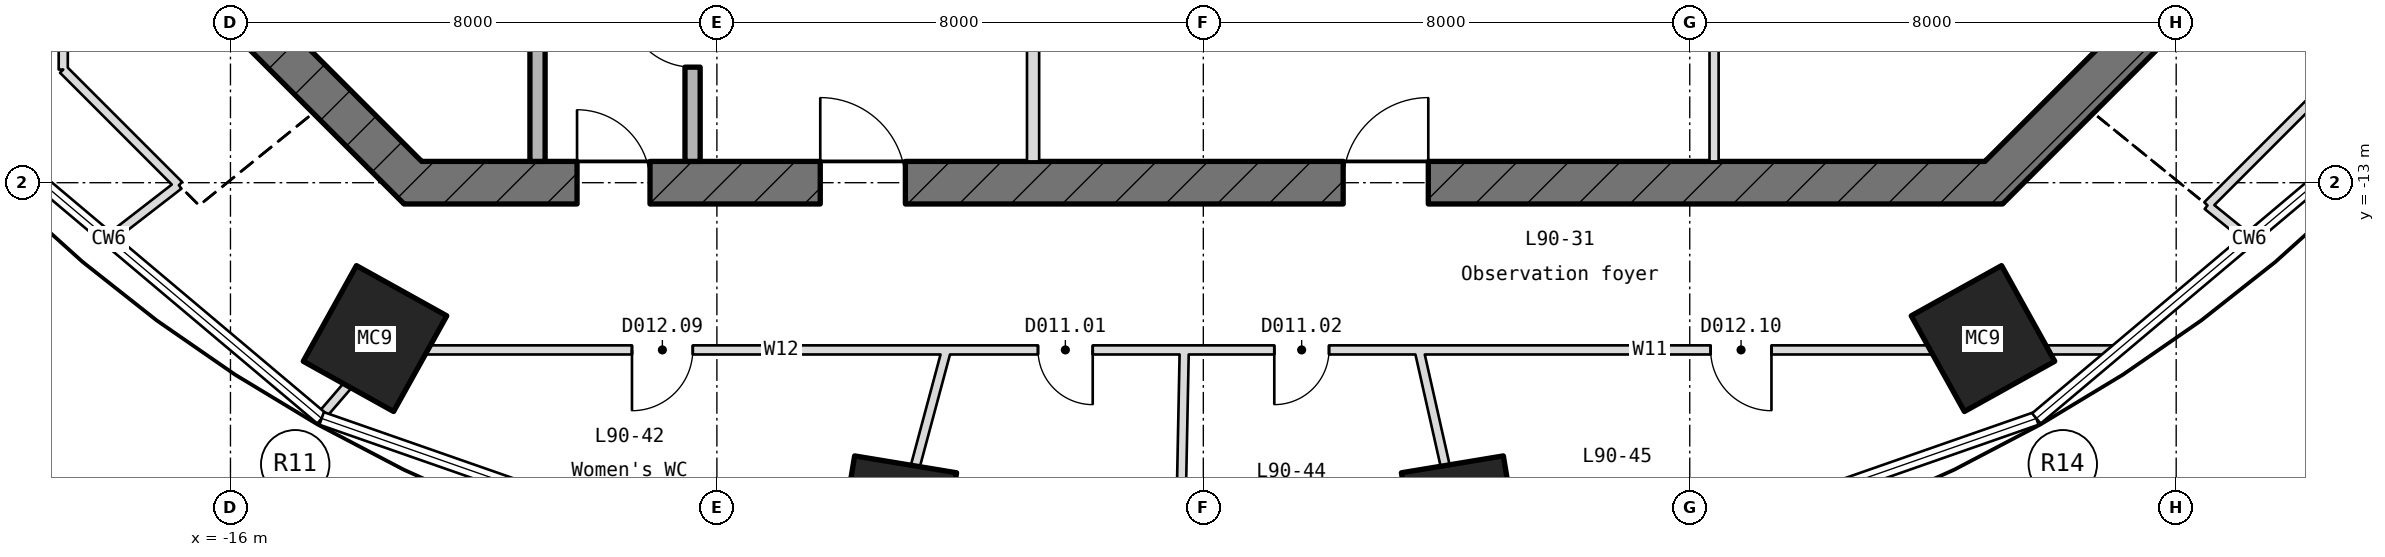
"""IFC4 building model, lengths in metres.
Left out: names, types, materials, properties, quantities, classifications, styles, units other than length and angle.
Written with IfcOpenShell. Run it as: python <this file> out.ifc"""

import sys

from ifc_helpers import new_model, si_unit, direction, frame, frame_2d, origin, origin_2d, place, context, subcontext, project, spatial, rectangle, hollow_rectangle, extrude, element, fill, save


model = new_model("IFC4")
c1 = context("Model", 3, precision=1e-05, world=origin(), true_north=direction((0.0, 1.0)))
c2 = subcontext(c1, "Body", "Model", "MODEL_VIEW")
j1 = project(units=[si_unit("LENGTHUNIT", "METRE"), si_unit("PLANEANGLEUNIT", "RADIAN")], contexts=[c1])
p1 = place(None, origin())
s1 = spatial("IfcSite", under=j1, at=p1, CompositionType="ELEMENT")
p2 = place(p1, origin())
s2 = spatial("IfcBuilding", under=s1, at=p2, CompositionType="ELEMENT")
p3 = place(p2, frame((0.0, 0.0, 396.55)))
s3 = spatial("IfcBuildingStorey", under=s2, at=p3, CompositionType="ELEMENT", Elevation=396.55)
for number, where, z_axis, x_axis in (
    (1, (-13.623, -15.563, -0.25), (0.0, 0.0, 1.0), (-0.874, 0.486, 0.0)),
    (2, (-5.043, -18.52, -0.25), (0.0, 0.0, 1.0), (-0.987, 0.163, 0.0)),
    (3, (4.243, -18.52, -0.25), (0.0, 0.0, 1.0), (-0.987, -0.163, 0.0)),
    (4, (12.823, -15.563, -0.25), (0.0, 0.0, 1.0), (-0.874, -0.486, 0.0)),
):
    element("IfcColumn", number, at=place(p3, frame(where, z_axis=z_axis, x_axis=x_axis)), inside=s3, PredefinedType="COLUMN", context=c2, shape_type="SweptSolid", body=[
        extrude(hollow_rectangle(XDim=1.7, YDim=1.8, WallThickness=0.05, at=origin_2d()), origin(), (0.0, 0.0, 1.0), 5.4),
    ])
for number, where, z_axis, x_axis in (
    (5, (12.897, -13.103, -0.25), (0.0, 0.0, 1.0), (0.707, 0.707, 0.0)),
    (6, (-16.103, -9.897, -0.25), (0.0, 0.0, 1.0), (0.707, -0.707, 0.0)),
):
    element("IfcWall", number, at=place(p3, frame(where, z_axis=z_axis, x_axis=x_axis)), inside=s3, PredefinedType="SHEAR", context=c2, shape_type="SweptSolid", body=[
        extrude(rectangle(XDim=4.533, YDim=0.7, at=frame_2d((2.266, 0.0))), origin(), (0.0, 0.0, 1.0), 5.4),
    ])
p4 = place(p3, frame((-13.145, -13.0, -0.25), z_axis=(0.0, 0.0, 1.0), x_axis=(1.0, 0.0, 0.0)))
e7 = element("IfcWall", 7, at=p4, inside=s3, PredefinedType="SHEAR", context=c2, shape_type="SweptSolid", body=[
    extrude(rectangle(XDim=26.29, YDim=0.7, at=frame_2d((13.145, 0.0))), origin(), (0.0, 0.0, 1.0), 5.4),
])
p5 = place(p4, frame((2.845, 0.0, 0.25)))
e8 = element("IfcOpeningElement", 8, at=p5, cuts=e7, PredefinedType="OPENING", context=c2, shape_type="SweptSolid", body=[
    extrude(rectangle(XDim=1.2, YDim=2.1, at=frame_2d((0.6, 1.05))), frame((0.0, 0.36, 0.0), z_axis=(0.0, -1.0, 0.0), x_axis=(1.0, 0.0, 0.0)), (0.0, 0.0, 1.0), 0.72),
])
p6 = place(p4, frame((6.845, 0.0, 0.25)))
e9 = element("IfcOpeningElement", 9, at=p6, cuts=e7, PredefinedType="OPENING", context=c2, shape_type="SweptSolid", body=[
    extrude(rectangle(XDim=1.4, YDim=2.1, at=frame_2d((0.7, 1.05))), frame((0.0, 0.36, 0.0), z_axis=(0.0, -1.0, 0.0), x_axis=(1.0, 0.0, 0.0)), (0.0, 0.0, 1.0), 0.72),
])
p7 = place(p4, frame((15.445, 0.0, 0.25)))
e10 = element("IfcOpeningElement", 10, at=p7, cuts=e7, PredefinedType="OPENING", context=c2, shape_type="SweptSolid", body=[
    extrude(rectangle(XDim=1.4, YDim=2.1, at=frame_2d((0.7, 1.05))), frame((0.0, 0.36, 0.0), z_axis=(0.0, -1.0, 0.0), x_axis=(1.0, 0.0, 0.0)), (0.0, 0.0, 1.0), 0.72),
])
p8 = place(p3, frame((-10.95, -12.65, 0.0), z_axis=(0.0, 0.0, 1.0), x_axis=(0.0, 1.0, 0.0)))
e11 = element("IfcWall", 11, at=p8, inside=s3, PredefinedType="STANDARD", context=c2, shape_type="SweptSolid", body=[
    extrude(rectangle(XDim=3.775, YDim=0.25, at=frame_2d((1.887, 0.0))), origin(), (0.0, 0.0, 1.0), 5.15),
])
p9 = place(p3, frame((-8.4, -12.65, 0.0), z_axis=(0.0, 0.0, 1.0), x_axis=(0.0, 1.0, 0.0)))
e12 = element("IfcWall", 12, at=p9, inside=s3, PredefinedType="STANDARD", context=c2, shape_type="SweptSolid", body=[
    extrude(rectangle(XDim=3.9, YDim=0.25, at=frame_2d((1.95, 0.0))), origin(), (0.0, 0.0, 1.0), 5.15),
])
p10 = place(p9, frame((1.55, 0.0, 0.0)))
e13 = element("IfcOpeningElement", 13, at=p10, cuts=e12, PredefinedType="OPENING", context=c2, shape_type="SweptSolid", body=[
    extrude(rectangle(XDim=1.1, YDim=2.1, at=frame_2d((0.55, 1.05))), frame((0.0, 0.135, 0.0), z_axis=(0.0, -1.0, 0.0), x_axis=(1.0, 0.0, 0.0)), (0.0, 0.0, 1.0), 0.27),
])
p11 = place(p3, frame((-2.8, -12.65, 0.0), z_axis=(0.0, 0.0, 1.0), x_axis=(0.0, 1.0, 0.0)))
e14 = element("IfcWall", 14, at=p11, inside=s3, PredefinedType="PARTITIONING", context=c2, shape_type="SweptSolid", body=[
    extrude(rectangle(XDim=4.19, YDim=0.2, at=frame_2d((2.095, 0.0))), origin(), (0.0, 0.0, 1.0), 5.15),
])
p12 = place(p3, frame((8.4, -12.65, 0.0), z_axis=(0.0, 0.0, 1.0), x_axis=(0.0, 1.0, 0.0)))
e15 = element("IfcWall", 15, at=p12, inside=s3, PredefinedType="PARTITIONING", context=c2, shape_type="SweptSolid", body=[
    extrude(rectangle(XDim=4.3, YDim=0.15, at=frame_2d((2.15, 0.0))), origin(), (0.0, 0.0, 1.0), 5.15),
])
p13 = place(p3, frame((-0.319, -15.75, 0.0), z_axis=(0.0, 0.0, 1.0), x_axis=(1.0, 0.0, 0.0)))
e16 = element("IfcWall", 16, at=p13, inside=s3, PredefinedType="PARTITIONING", context=c2, shape_type="SweptSolid", body=[
    extrude(rectangle(XDim=15.326, YDim=0.15, at=frame_2d((7.663, 0.0))), origin(), (0.0, 0.0, 1.0), 5.15),
])
p14 = place(p13, frame((1.486, 0.0, 0.0)))
e17 = element("IfcOpeningElement", 17, at=p14, cuts=e16, PredefinedType="OPENING", context=c2, shape_type="SweptSolid", body=[
    extrude(rectangle(XDim=0.9, YDim=2.1, at=frame_2d((0.45, 1.05))), frame((0.0, 0.085, 0.0), z_axis=(0.0, -1.0, 0.0), x_axis=(1.0, 0.0, 0.0)), (0.0, 0.0, 1.0), 0.17),
])
p15 = place(p13, frame((8.663, 0.0, 0.0)))
e18 = element("IfcOpeningElement", 18, at=p15, cuts=e16, PredefinedType="OPENING", context=c2, shape_type="SweptSolid", body=[
    extrude(rectangle(XDim=1.0, YDim=2.1, at=frame_2d((0.5, 1.05))), frame((0.0, 0.085, 0.0), z_axis=(0.0, -1.0, 0.0), x_axis=(1.0, 0.0, 0.0)), (0.0, 0.0, 1.0), 0.17),
])
p16 = place(p3, frame((-17.985, -13.915, 0.0), z_axis=(0.0, 0.0, 1.0), x_axis=(0.790899150715, 0.611946511877, 0.0)))
e19 = element("IfcWall", 19, at=p16, inside=s3, PredefinedType="PARTITIONING", context=c2, shape_type="SweptSolid", body=[
    extrude(rectangle(XDim=1.434, YDim=0.15, at=frame_2d((0.717, 0.0))), origin(), (0.0, 0.0, 1.0), 5.15),
])
p17 = place(p3, frame((16.515, -13.374, 0.0), z_axis=(0.0, 0.0, 1.0), x_axis=(0.707106781187, 0.707106781187, 0.0)))
e20 = element("IfcWall", 20, at=p17, inside=s3, PredefinedType="PARTITIONING", context=c2, shape_type="SweptSolid", body=[
    extrude(rectangle(XDim=3.16, YDim=0.15, at=frame_2d((1.58, 0.0))), origin(), (0.0, 0.0, 1.0), 5.15),
])
p18 = place(p3, frame((-18.75, -11.139, 0.0), z_axis=(0.0, 0.0, 1.0), x_axis=(0.0, 1.0, 0.0)))
e21 = element("IfcWall", 21, at=p18, inside=s3, PredefinedType="PARTITIONING", context=c2, shape_type="SweptSolid", body=[
    extrude(rectangle(XDim=22.278, YDim=0.15, at=frame_2d((11.139, 0.0))), origin(), (0.0, 0.0, 1.0), 5.15),
])
p19 = place(p18, frame((19.785, 0.0, 0.0)))
e22 = element("IfcOpeningElement", 22, at=p19, cuts=e21, PredefinedType="OPENING", context=c2, shape_type="SweptSolid", body=[
    extrude(rectangle(XDim=1.0, YDim=2.1, at=frame_2d((0.5, 1.05))), frame((0.0, 0.085, 0.0), z_axis=(0.0, -1.0, 0.0), x_axis=(1.0, 0.0, 0.0)), (0.0, 0.0, 1.0), 0.17),
])
p20 = place(p18, frame((13.014, 0.0, 0.0)))
e23 = element("IfcOpeningElement", 23, at=p20, cuts=e21, PredefinedType="OPENING", context=c2, shape_type="SweptSolid", body=[
    extrude(rectangle(XDim=1.0, YDim=2.1, at=frame_2d((0.5, 1.05))), frame((0.0, 0.085, 0.0), z_axis=(0.0, -1.0, 0.0), x_axis=(1.0, 0.0, 0.0)), (0.0, 0.0, 1.0), 0.17),
])
p21 = place(p18, frame((3.868, 0.0, 0.0)))
e24 = element("IfcOpeningElement", 24, at=p21, cuts=e21, PredefinedType="OPENING", context=c2, shape_type="SweptSolid", body=[
    extrude(rectangle(XDim=1.0, YDim=2.1, at=frame_2d((0.5, 1.05))), frame((0.0, 0.085, 0.0), z_axis=(0.0, -1.0, 0.0), x_axis=(1.0, 0.0, 0.0)), (0.0, 0.0, 1.0), 0.17),
])
p22 = place(p3, frame((4.087, -18.143, 0.0), z_axis=(0.0, 0.0, 1.0), x_axis=(-0.219732416391, 0.975560180198, 0.0)))
e25 = element("IfcWall", 25, at=p22, inside=s3, PredefinedType="PARTITIONING", context=c2, shape_type="SweptSolid", body=[
    extrude(rectangle(XDim=2.453, YDim=0.15, at=frame_2d((1.227, 0.0))), origin(), (0.0, 0.0, 1.0), 4.797),
])
p23 = place(p3, frame((-16.848, -13.041, 0.0), z_axis=(0.0, 0.0, 1.0), x_axis=(-0.707106781187, 0.707106781187, 0.0)))
e26 = element("IfcWall", 26, at=p23, inside=s3, PredefinedType="PARTITIONING", context=c2, shape_type="SweptSolid", body=[
    extrude(rectangle(XDim=2.69, YDim=0.15, at=frame_2d((1.345, 0.0))), origin(), (0.0, 0.0, 1.0), 4.688),
])
p24 = place(p3, frame((17.185, -13.916, 0.0), z_axis=(0.0, 0.0, 1.0), x_axis=(-0.77706665064, 0.629418319136, 0.0)))
e27 = element("IfcWall", 27, at=p24, inside=s3, PredefinedType="PARTITIONING", context=c2, shape_type="SweptSolid", body=[
    extrude(rectangle(XDim=0.862, YDim=0.15, at=frame_2d((0.431, 0.0))), origin(), (0.0, 0.0, 1.0), 5.15),
])
p25 = place(p3, frame((-13.569, -15.75, 0.0), z_axis=(0.0, 0.0, 1.0), x_axis=(1.0, 0.0, 0.0)))
e28 = element("IfcWall", 28, at=p25, inside=s3, PredefinedType="PARTITIONING", context=c2, shape_type="SweptSolid", body=[
    extrude(rectangle(XDim=13.26, YDim=0.15, at=frame_2d((6.63, 0.0))), origin(), (0.0, 0.0, 1.0), 5.15),
])
p26 = place(p25, frame((4.173, 0.0, 0.0)))
e29 = element("IfcOpeningElement", 29, at=p26, cuts=e28, PredefinedType="OPENING", context=c2, shape_type="SweptSolid", body=[
    extrude(rectangle(XDim=1.0, YDim=2.1, at=frame_2d((0.5, 1.05))), frame((0.0, 0.085, 0.0), z_axis=(0.0, -1.0, 0.0), x_axis=(1.0, 0.0, 0.0)), (0.0, 0.0, 1.0), 0.17),
])
p27 = place(p25, frame((10.85, 0.0, 0.0)))
e30 = element("IfcOpeningElement", 30, at=p27, cuts=e28, PredefinedType="OPENING", context=c2, shape_type="SweptSolid", body=[
    extrude(rectangle(XDim=0.9, YDim=2.1, at=frame_2d((0.45, 1.05))), frame((0.0, 0.085, 0.0), z_axis=(0.0, -1.0, 0.0), x_axis=(1.0, 0.0, 0.0)), (0.0, 0.0, 1.0), 0.17),
])
p28 = place(p3, frame((-14.51, -16.842, 0.0), z_axis=(0.0, 0.0, 1.0), x_axis=(0.652755375962, 0.757568755396, 0.0)))
e31 = element("IfcWall", 31, at=p28, inside=s3, PredefinedType="PARTITIONING", context=c2, shape_type="SweptSolid", body=[
    extrude(rectangle(XDim=1.442, YDim=0.15, at=frame_2d((0.721, 0.0))), origin(), (0.0, 0.0, 1.0), 5.15),
])
p29 = place(p3, frame((-4.867, -18.148, 0.0), z_axis=(0.0, 0.0, 1.0), x_axis=(0.258996568108, 0.965878241658, 0.0)))
e32 = element("IfcWall", 32, at=p29, inside=s3, PredefinedType="PARTITIONING", context=c2, shape_type="SweptSolid", body=[
    extrude(rectangle(XDim=2.483, YDim=0.15, at=frame_2d((1.241, 0.0))), origin(), (0.0, 0.0, 1.0), 4.797),
])
p30 = place(p3, frame((-0.367, -18.414, 0.0), z_axis=(0.0, 0.0, 1.0), x_axis=(0.019880611414, 0.999802361114, 0.0)))
e33 = element("IfcWall", 33, at=p30, inside=s3, PredefinedType="PARTITIONING", context=c2, shape_type="SweptSolid", body=[
    extrude(rectangle(XDim=2.665, YDim=0.15, at=frame_2d((1.333, 0.0))), origin(), (0.0, 0.0, 1.0), 4.84),
])
p31 = place(p10, origin())
e34 = element("IfcDoor", 34, at=p31, inside=s3, OperationType="SINGLE_SWING_RIGHT", PredefinedType="DOOR", context=c2, shape_type="SweptSolid", body=[
    extrude(rectangle(XDim=1.1, YDim=2.1, at=frame_2d((0.55, 1.05))), frame((0.0, 0.025, 0.0), z_axis=(0.0, -1.0, 0.0), x_axis=(1.0, 0.0, 0.0)), (0.0, 0.0, 1.0), 0.05),
])
fill(e13, e34)
p32 = place(p5, origin())
e35 = element("IfcDoor", 35, at=p32, inside=s3, OperationType="SINGLE_SWING_RIGHT", PredefinedType="DOOR", context=c2, shape_type="SweptSolid", body=[
    extrude(rectangle(XDim=1.2, YDim=2.1, at=frame_2d((0.6, 1.05))), frame((0.0, 0.025, 0.0), z_axis=(0.0, -1.0, 0.0), x_axis=(1.0, 0.0, 0.0)), (0.0, 0.0, 1.0), 0.05),
])
fill(e8, e35)
p33 = place(p6, origin())
e36 = element("IfcDoor", 36, at=p33, inside=s3, OperationType="SINGLE_SWING_RIGHT", PredefinedType="DOOR", context=c2, shape_type="SweptSolid", body=[
    extrude(rectangle(XDim=1.4, YDim=2.1, at=frame_2d((0.7, 1.05))), frame((0.0, 0.025, 0.0), z_axis=(0.0, -1.0, 0.0), x_axis=(1.0, 0.0, 0.0)), (0.0, 0.0, 1.0), 0.05),
])
fill(e9, e36)
p34 = place(p7, origin())
e37 = element("IfcDoor", 37, at=p34, inside=s3, OperationType="SINGLE_SWING_RIGHT", PredefinedType="DOOR", context=c2, shape_type="SweptSolid", body=[
    extrude(rectangle(XDim=1.4, YDim=2.1, at=frame_2d((0.7, 1.05))), frame((0.0, 0.025, 0.0), z_axis=(0.0, -1.0, 0.0), x_axis=(1.0, 0.0, 0.0)), (0.0, 0.0, 1.0), 0.05),
])
fill(e10, e37)
p35 = place(p26, frame((1.0, 0.0, 0.0), z_axis=(0.0, 0.0, 1.0), x_axis=(-1.0, 0.0, 0.0)))
e38 = element("IfcDoor", 38, at=p35, inside=s3, OperationType="SINGLE_SWING_LEFT", PredefinedType="DOOR", context=c2, shape_type="SweptSolid", body=[
    extrude(rectangle(XDim=1.0, YDim=2.1, at=frame_2d((0.5, 1.05))), frame((0.0, 0.025, 0.0), z_axis=(0.0, -1.0, 0.0), x_axis=(1.0, 0.0, 0.0)), (0.0, 0.0, 1.0), 0.05),
])
fill(e29, e38)
p36 = place(p27, frame((0.9, 0.0, 0.0), z_axis=(0.0, 0.0, 1.0), x_axis=(-1.0, 0.0, 0.0)))
e39 = element("IfcDoor", 39, at=p36, inside=s3, OperationType="SINGLE_SWING_LEFT", PredefinedType="DOOR", context=c2, shape_type="SweptSolid", body=[
    extrude(rectangle(XDim=0.9, YDim=2.1, at=frame_2d((0.45, 1.05))), frame((0.0, 0.025, 0.0), z_axis=(0.0, -1.0, 0.0), x_axis=(1.0, 0.0, 0.0)), (0.0, 0.0, 1.0), 0.05),
])
fill(e30, e39)
p37 = place(p14, frame((0.9, 0.0, 0.0), z_axis=(0.0, 0.0, 1.0), x_axis=(-1.0, 0.0, 0.0)))
e40 = element("IfcDoor", 40, at=p37, inside=s3, OperationType="SINGLE_SWING_LEFT", PredefinedType="DOOR", context=c2, shape_type="SweptSolid", body=[
    extrude(rectangle(XDim=0.9, YDim=2.1, at=frame_2d((0.45, 1.05))), frame((0.0, 0.025, 0.0), z_axis=(0.0, -1.0, 0.0), x_axis=(1.0, 0.0, 0.0)), (0.0, 0.0, 1.0), 0.05),
])
fill(e17, e40)
p38 = place(p15, frame((1.0, 0.0, 0.0), z_axis=(0.0, 0.0, 1.0), x_axis=(-1.0, 0.0, 0.0)))
e41 = element("IfcDoor", 41, at=p38, inside=s3, OperationType="SINGLE_SWING_LEFT", PredefinedType="DOOR", context=c2, shape_type="SweptSolid", body=[
    extrude(rectangle(XDim=1.0, YDim=2.1, at=frame_2d((0.5, 1.05))), frame((0.0, 0.025, 0.0), z_axis=(0.0, -1.0, 0.0), x_axis=(1.0, 0.0, 0.0)), (0.0, 0.0, 1.0), 0.05),
])
fill(e18, e41)
save(model, sys.argv[1])
